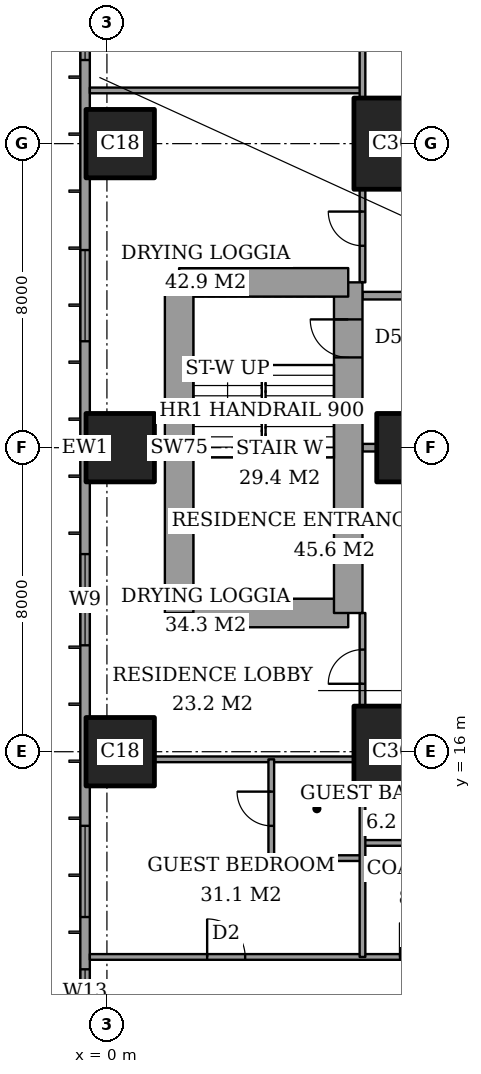
"""IFC4 building model, lengths in metres.
Left out: names, types, materials, properties, quantities, classifications, styles, units other than length and angle.
Written with IfcOpenShell. Run it as: python <this file> out.ifc"""

import sys

from ifc_helpers import new_model, si_unit, direction, frame, frame_2d, origin, origin_2d, place, context, subcontext, project, spatial, rectangle, extrude, element, fill, save


model = new_model("IFC4")
c1 = context("Model", 3, precision=1e-05, world=origin(), true_north=direction((0.0, 1.0)))
c2 = subcontext(c1, "Body", "Model", "MODEL_VIEW")
j1 = project(units=[si_unit("LENGTHUNIT", "METRE"), si_unit("PLANEANGLEUNIT", "RADIAN")], contexts=[c1])
p1 = place(None, origin())
s1 = spatial("IfcSite", under=j1, at=p1, CompositionType="ELEMENT")
p2 = place(p1, origin())
s2 = spatial("IfcBuilding", under=s1, at=p2, CompositionType="ELEMENT")
p3 = place(p2, frame((0.0, 0.0, 214.6)))
s3 = spatial("IfcBuildingStorey", under=s2, at=p3, CompositionType="ELEMENT", Elevation=214.6)
for number, where, z_axis, x_axis in (
    (1, (0.35, 16.0, 0.0), (0.0, 0.0, 1.0), (1.0, 0.0, 0.0)),
    (2, (0.35, 24.0, 0.0), (0.0, 0.0, 1.0), (1.0, 0.0, 0.0)),
    (3, (0.35, 32.0, 0.0), (0.0, 0.0, 1.0), (1.0, 0.0, 0.0)),
):
    element("IfcColumn", number, at=place(p3, frame(where, z_axis=z_axis, x_axis=x_axis)), inside=s3, PredefinedType="COLUMN", context=c2, shape_type="SweptSolid", body=[
        extrude(rectangle(XDim=1.8, YDim=1.8, at=origin_2d()), origin(), (0.0, 0.0, 1.0), 3.6),
    ])
p4 = place(p3, frame((8.0, 16.0, 0.0), z_axis=(0.0, 0.0, 1.0), x_axis=(1.0, 0.0, 0.0)))
e4 = element("IfcColumn", 4, at=p4, inside=s3, PredefinedType="COLUMN", context=c2, shape_type="SweptSolid", body=[
    extrude(rectangle(XDim=3.0, YDim=2.4, at=origin_2d()), origin(), (0.0, 0.0, 1.0), 3.6),
])
p5 = place(p3, frame((8.0, 24.0, 0.0), z_axis=(0.0, 0.0, 1.0), x_axis=(1.0, 0.0, 0.0)))
e5 = element("IfcColumn", 5, at=p5, inside=s3, PredefinedType="COLUMN", context=c2, shape_type="SweptSolid", body=[
    extrude(rectangle(XDim=1.8, YDim=1.8, at=origin_2d()), origin(), (0.0, 0.0, 1.0), 3.6),
])
p6 = place(p3, frame((8.0, 32.0, 0.0), z_axis=(0.0, 0.0, 1.0), x_axis=(1.0, 0.0, 0.0)))
e6 = element("IfcColumn", 6, at=p6, inside=s3, PredefinedType="COLUMN", context=c2, shape_type="SweptSolid", body=[
    extrude(rectangle(XDim=3.0, YDim=2.4, at=origin_2d()), origin(), (0.0, 0.0, 1.0), 3.6),
])
p7 = place(p3, frame((1.9, 19.65, 0.0), z_axis=(0.0, 0.0, 1.0), x_axis=(1.0, 0.0, 0.0)))
e7 = element("IfcWall", 7, at=p7, inside=s3, PredefinedType="SHEAR", context=c2, shape_type="SweptSolid", body=[
    extrude(rectangle(XDim=4.45, YDim=0.75, at=frame_2d((2.225, 0.0))), origin(), (0.0, 0.0, 1.0), 3.6),
])
p8 = place(p3, frame((6.35, 19.65, 0.0), z_axis=(0.0, 0.0, 1.0), x_axis=(0.0, 1.0, 0.0)))
e8 = element("IfcWall", 8, at=p8, inside=s3, PredefinedType="SHEAR", context=c2, shape_type="SweptSolid", body=[
    extrude(rectangle(XDim=8.7, YDim=0.75, at=frame_2d((4.35, 0.0))), origin(), (0.0, 0.0, 1.0), 3.6),
])
p9 = place(p8, frame((6.725, 0.0, 0.0)))
e9 = element("IfcOpeningElement", 9, at=p9, cuts=e8, PredefinedType="OPENING", context=c2, shape_type="SweptSolid", body=[
    extrude(rectangle(XDim=1.0, YDim=2.1, at=frame_2d((0.5, 1.05))), frame((0.0, 0.385, 0.0), z_axis=(0.0, -1.0, 0.0), x_axis=(1.0, 0.0, 0.0)), (0.0, 0.0, 1.0), 0.77),
])
p10 = place(p3, frame((6.35, 28.35, 0.0), z_axis=(0.0, 0.0, 1.0), x_axis=(-1.0, 0.0, 0.0)))
e10 = element("IfcWall", 10, at=p10, inside=s3, PredefinedType="SHEAR", context=c2, shape_type="SweptSolid", body=[
    extrude(rectangle(XDim=4.45, YDim=0.75, at=frame_2d((2.225, 0.0))), origin(), (0.0, 0.0, 1.0), 3.6),
])
p11 = place(p3, frame((1.9, 28.35, 0.0), z_axis=(0.0, 0.0, 1.0), x_axis=(0.0, -1.0, 0.0)))
e11 = element("IfcWall", 11, at=p11, inside=s3, PredefinedType="SHEAR", context=c2, shape_type="SweptSolid", body=[
    extrude(rectangle(XDim=8.7, YDim=0.75, at=frame_2d((4.35, 0.0))), origin(), (0.0, 0.0, 1.0), 3.6),
])
p12 = place(p3, frame((-0.575, 44.825, 0.0), z_axis=(0.0, 0.0, 1.0), x_axis=(0.0, -1.0, 0.0)))
e12 = element("IfcWall", 12, at=p12, inside=s3, PredefinedType="SOLIDWALL", context=c2, shape_type="SweptSolid", body=[
    extrude(rectangle(XDim=41.65, YDim=0.25, at=frame_2d((20.825, 0.0))), origin(), (0.0, 0.0, 1.0), 3.6),
])
p13 = place(p12, frame((0.825, 0.0, 0.2)))
e13 = element("IfcOpeningElement", 13, at=p13, cuts=e12, PredefinedType="OPENING", context=c2, shape_type="SweptSolid", body=[
    extrude(rectangle(XDim=2.4, YDim=2.4, at=frame_2d((1.2, 1.2))), frame((0.0, 0.135, 0.0), z_axis=(0.0, -1.0, 0.0), x_axis=(1.0, 0.0, 0.0)), (0.0, 0.0, 1.0), 0.27),
])
p14 = place(p12, frame((6.05, 0.0, 0.2)))
e14 = element("IfcOpeningElement", 14, at=p14, cuts=e12, PredefinedType="OPENING", context=c2, shape_type="SweptSolid", body=[
    extrude(rectangle(XDim=1.2, YDim=2.4, at=frame_2d((0.6, 1.2))), frame((0.0, 0.135, 0.0), z_axis=(0.0, -1.0, 0.0), x_axis=(1.0, 0.0, 0.0)), (0.0, 0.0, 1.0), 0.27),
])
p15 = place(p12, frame((8.225, 0.0, 0.2)))
e15 = element("IfcOpeningElement", 15, at=p15, cuts=e12, PredefinedType="OPENING", context=c2, shape_type="SweptSolid", body=[
    extrude(rectangle(XDim=2.4, YDim=2.4, at=frame_2d((1.2, 1.2))), frame((0.0, 0.135, 0.0), z_axis=(0.0, -1.0, 0.0), x_axis=(1.0, 0.0, 0.0)), (0.0, 0.0, 1.0), 0.27),
])
p16 = place(p12, frame((15.625, 0.0, 0.2)))
e16 = element("IfcOpeningElement", 16, at=p16, cuts=e12, PredefinedType="OPENING", context=c2, shape_type="SweptSolid", body=[
    extrude(rectangle(XDim=2.4, YDim=2.4, at=frame_2d((1.2, 1.2))), frame((0.0, 0.135, 0.0), z_axis=(0.0, -1.0, 0.0), x_axis=(1.0, 0.0, 0.0)), (0.0, 0.0, 1.0), 0.27),
])
p17 = place(p12, frame((23.625, 0.0, 0.2)))
e17 = element("IfcOpeningElement", 17, at=p17, cuts=e12, PredefinedType="OPENING", context=c2, shape_type="SweptSolid", body=[
    extrude(rectangle(XDim=2.4, YDim=2.4, at=frame_2d((1.2, 1.2))), frame((0.0, 0.135, 0.0), z_axis=(0.0, -1.0, 0.0), x_axis=(1.0, 0.0, 0.0)), (0.0, 0.0, 1.0), 0.27),
])
p18 = place(p12, frame((30.775, 0.0, 0.2)))
e18 = element("IfcOpeningElement", 18, at=p18, cuts=e12, PredefinedType="OPENING", context=c2, shape_type="SweptSolid", body=[
    extrude(rectangle(XDim=2.4, YDim=2.4, at=frame_2d((1.2, 1.2))), frame((0.0, 0.135, 0.0), z_axis=(0.0, -1.0, 0.0), x_axis=(1.0, 0.0, 0.0)), (0.0, 0.0, 1.0), 0.27),
])
p19 = place(p12, frame((34.55, 0.0, 0.2)))
e19 = element("IfcOpeningElement", 19, at=p19, cuts=e12, PredefinedType="OPENING", context=c2, shape_type="SweptSolid", body=[
    extrude(rectangle(XDim=1.2, YDim=2.4, at=frame_2d((0.6, 1.2))), frame((0.0, 0.135, 0.0), z_axis=(0.0, -1.0, 0.0), x_axis=(1.0, 0.0, 0.0)), (0.0, 0.0, 1.0), 0.27),
])
p20 = place(p12, frame((38.425, 0.0, 0.2)))
e20 = element("IfcOpeningElement", 20, at=p20, cuts=e12, PredefinedType="OPENING", context=c2, shape_type="SweptSolid", body=[
    extrude(rectangle(XDim=2.4, YDim=2.4, at=frame_2d((1.2, 1.2))), frame((0.0, 0.135, 0.0), z_axis=(0.0, -1.0, 0.0), x_axis=(1.0, 0.0, 0.0)), (0.0, 0.0, 1.0), 0.27),
])
p21 = place(p3, frame((-0.45, 10.6, 0.0), z_axis=(0.0, 0.0, 1.0), x_axis=(1.0, 0.0, 0.0)))
e21 = element("IfcWall", 21, at=p21, inside=s3, PredefinedType="PARTITIONING", context=c2, shape_type="SweptSolid", body=[
    extrude(rectangle(XDim=25.011, YDim=0.15, at=frame_2d((12.505, 0.0))), origin(), (0.0, 0.0, 1.0), 3.35),
])
p22 = place(p21, frame((10.65, 0.0, 0.0)))
e22 = element("IfcOpeningElement", 22, at=p22, cuts=e21, PredefinedType="OPENING", context=c2, shape_type="SweptSolid", body=[
    extrude(rectangle(XDim=1.0, YDim=2.1, at=frame_2d((0.5, 1.05))), frame((0.0, 0.085, 0.0), z_axis=(0.0, -1.0, 0.0), x_axis=(1.0, 0.0, 0.0)), (0.0, 0.0, 1.0), 0.17),
])
p23 = place(p21, frame((3.087, 0.0, 0.0)))
e23 = element("IfcOpeningElement", 23, at=p23, cuts=e21, PredefinedType="OPENING", context=c2, shape_type="SweptSolid", body=[
    extrude(rectangle(XDim=1.0, YDim=2.1, at=frame_2d((0.5, 1.05))), frame((0.0, 0.085, 0.0), z_axis=(0.0, -1.0, 0.0), x_axis=(1.0, 0.0, 0.0)), (0.0, 0.0, 1.0), 0.17),
])
p24 = place(p21, frame((8.163, 0.0, 0.0)))
e24 = element("IfcOpeningElement", 24, at=p24, cuts=e21, PredefinedType="OPENING", context=c2, shape_type="SweptSolid", body=[
    extrude(rectangle(XDim=0.9, YDim=2.1, at=frame_2d((0.45, 1.05))), frame((0.0, 0.085, 0.0), z_axis=(0.0, -1.0, 0.0), x_axis=(1.0, 0.0, 0.0)), (0.0, 0.0, 1.0), 0.17),
])
p25 = place(p21, frame((13.35, 0.0, 0.0)))
e25 = element("IfcOpeningElement", 25, at=p25, cuts=e21, PredefinedType="OPENING", context=c2, shape_type="SweptSolid", body=[
    extrude(rectangle(XDim=1.0, YDim=2.1, at=frame_2d((0.5, 1.05))), frame((0.0, 0.085, 0.0), z_axis=(0.0, -1.0, 0.0), x_axis=(1.0, 0.0, 0.0)), (0.0, 0.0, 1.0), 0.17),
])
p26 = place(p21, frame((16.5, 0.0, 0.0)))
e26 = element("IfcOpeningElement", 26, at=p26, cuts=e21, PredefinedType="OPENING", context=c2, shape_type="SweptSolid", body=[
    extrude(rectangle(XDim=0.9, YDim=2.1, at=frame_2d((0.45, 1.05))), frame((0.0, 0.085, 0.0), z_axis=(0.0, -1.0, 0.0), x_axis=(1.0, 0.0, 0.0)), (0.0, 0.0, 1.0), 0.17),
])
p27 = place(p21, frame((21.175, 0.0, 0.0)))
e27 = element("IfcOpeningElement", 27, at=p27, cuts=e21, PredefinedType="OPENING", context=c2, shape_type="SweptSolid", body=[
    extrude(rectangle(XDim=1.0, YDim=2.1, at=frame_2d((0.5, 1.05))), frame((0.0, 0.085, 0.0), z_axis=(0.0, -1.0, 0.0), x_axis=(1.0, 0.0, 0.0)), (0.0, 0.0, 1.0), 0.17),
])
p28 = place(p3, frame((4.325, 13.2, 0.0), z_axis=(0.0, 0.0, 1.0), x_axis=(1.0, 0.0, 0.0)))
e28 = element("IfcWall", 28, at=p28, inside=s3, PredefinedType="PARTITIONING", context=c2, shape_type="SweptSolid", body=[
    extrude(rectangle(XDim=2.4, YDim=0.15, at=frame_2d((1.2, 0.0))), origin(), (0.0, 0.0, 1.0), 3.35),
])
p29 = place(p3, frame((6.725, 13.6, 0.0), z_axis=(0.0, 0.0, 1.0), x_axis=(1.0, 0.0, 0.0)))
e29 = element("IfcWall", 29, at=p29, inside=s3, PredefinedType="PARTITIONING", context=c2, shape_type="SweptSolid", body=[
    extrude(rectangle(XDim=2.875, YDim=0.15, at=frame_2d((1.438, 0.0))), origin(), (0.0, 0.0, 1.0), 3.35),
])
p30 = place(p3, frame((1.25, 15.8, 0.0), z_axis=(0.0, 0.0, 1.0), x_axis=(1.0, 0.0, 0.0)))
e30 = element("IfcWall", 30, at=p30, inside=s3, PredefinedType="PARTITIONING", context=c2, shape_type="SweptSolid", body=[
    extrude(rectangle(XDim=5.25, YDim=0.15, at=frame_2d((2.625, 0.0))), origin(), (0.0, 0.0, 1.0), 3.35),
])
p31 = place(p3, frame((6.725, 24.0, 0.0), z_axis=(0.0, 0.0, 1.0), x_axis=(1.0, 0.0, 0.0)))
e31 = element("IfcWall", 31, at=p31, inside=s3, PredefinedType="PARTITIONING", context=c2, shape_type="SweptSolid", body=[
    extrude(rectangle(XDim=0.375, YDim=0.2, at=frame_2d((0.188, 0.0))), origin(), (0.0, 0.0, 1.0), 3.35),
])
p32 = place(p3, frame((6.725, 28.0, 0.0), z_axis=(0.0, 0.0, 1.0), x_axis=(1.0, 0.0, 0.0)))
e32 = element("IfcWall", 32, at=p32, inside=s3, PredefinedType="PARTITIONING", context=c2, shape_type="SweptSolid", body=[
    extrude(rectangle(XDim=17.275, YDim=0.2, at=frame_2d((8.637, 0.0))), origin(), (0.0, 0.0, 1.0), 3.35),
])
p33 = place(p32, frame((6.775, 0.0, 0.0)))
e33 = element("IfcOpeningElement", 33, at=p33, cuts=e32, PredefinedType="OPENING", context=c2, shape_type="SweptSolid", body=[
    extrude(rectangle(XDim=1.2, YDim=2.4, at=frame_2d((0.6, 1.2))), frame((0.0, 0.11, 0.0), z_axis=(0.0, -1.0, 0.0), x_axis=(1.0, 0.0, 0.0)), (0.0, 0.0, 1.0), 0.22),
])
p34 = place(p3, frame((-0.45, 33.4, 0.0), z_axis=(0.0, 0.0, 1.0), x_axis=(1.0, 0.0, 0.0)))
e34 = element("IfcWall", 34, at=p34, inside=s3, PredefinedType="PARTITIONING", context=c2, shape_type="SweptSolid", body=[
    extrude(rectangle(XDim=7.175, YDim=0.15, at=frame_2d((3.587, 0.0))), origin(), (0.0, 0.0, 1.0), 3.35),
])
p35 = place(p3, frame((4.325, 13.2, 0.0), z_axis=(0.0, 0.0, 1.0), x_axis=(0.0, 1.0, 0.0)))
e35 = element("IfcWall", 35, at=p35, inside=s3, PredefinedType="PARTITIONING", context=c2, shape_type="SweptSolid", body=[
    extrude(rectangle(XDim=2.6, YDim=0.15, at=frame_2d((1.3, 0.0))), origin(), (0.0, 0.0, 1.0), 3.35),
])
p36 = place(p35, frame((0.85, 0.0, 0.0)))
e36 = element("IfcOpeningElement", 36, at=p36, cuts=e35, PredefinedType="OPENING", context=c2, shape_type="SweptSolid", body=[
    extrude(rectangle(XDim=0.9, YDim=2.1, at=frame_2d((0.45, 1.05))), frame((0.0, 0.085, 0.0), z_axis=(0.0, -1.0, 0.0), x_axis=(1.0, 0.0, 0.0)), (0.0, 0.0, 1.0), 0.17),
])
p37 = place(p3, frame((6.725, 10.6, 0.0), z_axis=(0.0, 0.0, 1.0), x_axis=(0.0, 1.0, 0.0)))
e37 = element("IfcWall", 37, at=p37, inside=s3, PredefinedType="PARTITIONING", context=c2, shape_type="SweptSolid", body=[
    extrude(rectangle(XDim=4.2, YDim=0.15, at=frame_2d((2.1, 0.0))), origin(), (0.0, 0.0, 1.0), 3.35),
])
p38 = place(p3, frame((6.725, 17.2, 0.0), z_axis=(0.0, 0.0, 1.0), x_axis=(0.0, 1.0, 0.0)))
e38 = element("IfcWall", 38, at=p38, inside=s3, PredefinedType="PARTITIONING", context=c2, shape_type="SweptSolid", body=[
    extrude(rectangle(XDim=2.45, YDim=0.15, at=frame_2d((1.225, 0.0))), origin(), (0.0, 0.0, 1.0), 3.35),
])
p39 = place(p38, frame((0.587, 0.0, 0.0)))
e39 = element("IfcOpeningElement", 39, at=p39, cuts=e38, PredefinedType="OPENING", context=c2, shape_type="SweptSolid", body=[
    extrude(rectangle(XDim=0.9, YDim=2.1, at=frame_2d((0.45, 1.05))), frame((0.0, 0.085, 0.0), z_axis=(0.0, -1.0, 0.0), x_axis=(1.0, 0.0, 0.0)), (0.0, 0.0, 1.0), 0.17),
])
p40 = place(p3, frame((6.725, 28.35, 0.0), z_axis=(0.0, 0.0, 1.0), x_axis=(0.0, 1.0, 0.0)))
e40 = element("IfcWall", 40, at=p40, inside=s3, PredefinedType="PARTITIONING", context=c2, shape_type="SweptSolid", body=[
    extrude(rectangle(XDim=2.45, YDim=0.15, at=frame_2d((1.225, 0.0))), origin(), (0.0, 0.0, 1.0), 3.35),
])
p41 = place(p40, frame((0.962, 0.0, 0.0)))
e41 = element("IfcOpeningElement", 41, at=p41, cuts=e40, PredefinedType="OPENING", context=c2, shape_type="SweptSolid", body=[
    extrude(rectangle(XDim=0.9, YDim=2.1, at=frame_2d((0.45, 1.05))), frame((0.0, 0.085, 0.0), z_axis=(0.0, -1.0, 0.0), x_axis=(1.0, 0.0, 0.0)), (0.0, 0.0, 1.0), 0.17),
])
p42 = place(p3, frame((6.725, 33.2, 0.0), z_axis=(0.0, 0.0, 1.0), x_axis=(0.0, 1.0, 0.0)))
e42 = element("IfcWall", 42, at=p42, inside=s3, PredefinedType="PARTITIONING", context=c2, shape_type="SweptSolid", body=[
    extrude(rectangle(XDim=4.2, YDim=0.15, at=frame_2d((2.1, 0.0))), origin(), (0.0, 0.0, 1.0), 3.35),
])
p43 = place(p15, origin())
e43 = element("IfcWindow", 43, at=p43, inside=s3, PartitioningType="SINGLE_PANEL", PredefinedType="WINDOW", context=c2, shape_type="SweptSolid", body=[
    extrude(rectangle(XDim=2.4, YDim=2.4, at=frame_2d((1.2, 1.2))), frame((0.0, 0.03, 0.0), z_axis=(0.0, -1.0, 0.0), x_axis=(1.0, 0.0, 0.0)), (0.0, 0.0, 1.0), 0.06),
])
fill(e15, e43)
p44 = place(p16, origin())
e44 = element("IfcWindow", 44, at=p44, inside=s3, PartitioningType="SINGLE_PANEL", PredefinedType="WINDOW", context=c2, shape_type="SweptSolid", body=[
    extrude(rectangle(XDim=2.4, YDim=2.4, at=frame_2d((1.2, 1.2))), frame((0.0, 0.03, 0.0), z_axis=(0.0, -1.0, 0.0), x_axis=(1.0, 0.0, 0.0)), (0.0, 0.0, 1.0), 0.06),
])
fill(e16, e44)
p45 = place(p17, origin())
e45 = element("IfcWindow", 45, at=p45, inside=s3, PartitioningType="SINGLE_PANEL", PredefinedType="WINDOW", context=c2, shape_type="SweptSolid", body=[
    extrude(rectangle(XDim=2.4, YDim=2.4, at=frame_2d((1.2, 1.2))), frame((0.0, 0.03, 0.0), z_axis=(0.0, -1.0, 0.0), x_axis=(1.0, 0.0, 0.0)), (0.0, 0.0, 1.0), 0.06),
])
fill(e17, e45)
p46 = place(p18, origin())
e46 = element("IfcWindow", 46, at=p46, inside=s3, PartitioningType="SINGLE_PANEL", PredefinedType="WINDOW", context=c2, shape_type="SweptSolid", body=[
    extrude(rectangle(XDim=2.4, YDim=2.4, at=frame_2d((1.2, 1.2))), frame((0.0, 0.03, 0.0), z_axis=(0.0, -1.0, 0.0), x_axis=(1.0, 0.0, 0.0)), (0.0, 0.0, 1.0), 0.06),
])
fill(e18, e46)
p47 = place(p19, origin())
e47 = element("IfcWindow", 47, at=p47, inside=s3, PartitioningType="SINGLE_PANEL", PredefinedType="WINDOW", context=c2, shape_type="SweptSolid", body=[
    extrude(rectangle(XDim=1.2, YDim=2.4, at=frame_2d((0.6, 1.2))), frame((0.0, 0.03, 0.0), z_axis=(0.0, -1.0, 0.0), x_axis=(1.0, 0.0, 0.0)), (0.0, 0.0, 1.0), 0.06),
])
fill(e19, e47)
p48 = place(p36, origin())
e48 = element("IfcDoor", 48, at=p48, inside=s3, OperationType="SINGLE_SWING_LEFT", PredefinedType="DOOR", context=c2, shape_type="SweptSolid", body=[
    extrude(rectangle(XDim=0.9, YDim=2.1, at=frame_2d((0.45, 1.05))), frame((0.0, 0.025, 0.0), z_axis=(0.0, -1.0, 0.0), x_axis=(1.0, 0.0, 0.0)), (0.0, 0.0, 1.0), 0.05),
])
fill(e36, e48)
p49 = place(p23, origin())
e49 = element("IfcDoor", 49, at=p49, inside=s3, OperationType="SINGLE_SWING_RIGHT", PredefinedType="DOOR", context=c2, shape_type="SweptSolid", body=[
    extrude(rectangle(XDim=1.0, YDim=2.1, at=frame_2d((0.5, 1.05))), frame((0.0, 0.025, 0.0), z_axis=(0.0, -1.0, 0.0), x_axis=(1.0, 0.0, 0.0)), (0.0, 0.0, 1.0), 0.05),
])
fill(e23, e49)
p50 = place(p39, origin())
e50 = element("IfcDoor", 50, at=p50, inside=s3, OperationType="SINGLE_SWING_RIGHT", PredefinedType="DOOR", context=c2, shape_type="SweptSolid", body=[
    extrude(rectangle(XDim=0.9, YDim=2.1, at=frame_2d((0.45, 1.05))), frame((0.0, 0.025, 0.0), z_axis=(0.0, -1.0, 0.0), x_axis=(1.0, 0.0, 0.0)), (0.0, 0.0, 1.0), 0.05),
])
fill(e39, e50)
p51 = place(p24, origin())
e51 = element("IfcDoor", 51, at=p51, inside=s3, OperationType="SINGLE_SWING_RIGHT", PredefinedType="DOOR", context=c2, shape_type="SweptSolid", body=[
    extrude(rectangle(XDim=0.9, YDim=2.1, at=frame_2d((0.45, 1.05))), frame((0.0, 0.025, 0.0), z_axis=(0.0, -1.0, 0.0), x_axis=(1.0, 0.0, 0.0)), (0.0, 0.0, 1.0), 0.05),
])
fill(e24, e51)
p52 = place(p41, origin())
e52 = element("IfcDoor", 52, at=p52, inside=s3, OperationType="SINGLE_SWING_LEFT", PredefinedType="DOOR", context=c2, shape_type="SweptSolid", body=[
    extrude(rectangle(XDim=0.9, YDim=2.1, at=frame_2d((0.45, 1.05))), frame((0.0, 0.025, 0.0), z_axis=(0.0, -1.0, 0.0), x_axis=(1.0, 0.0, 0.0)), (0.0, 0.0, 1.0), 0.05),
])
fill(e41, e52)
p53 = place(p9, origin())
e53 = element("IfcDoor", 53, at=p53, inside=s3, OperationType="SINGLE_SWING_LEFT", PredefinedType="DOOR", context=c2, shape_type="SweptSolid", body=[
    extrude(rectangle(XDim=1.0, YDim=2.1, at=frame_2d((0.5, 1.05))), frame((0.0, 0.025, 0.0), z_axis=(0.0, -1.0, 0.0), x_axis=(1.0, 0.0, 0.0)), (0.0, 0.0, 1.0), 0.05),
])
fill(e9, e53)
save(model, sys.argv[1])
